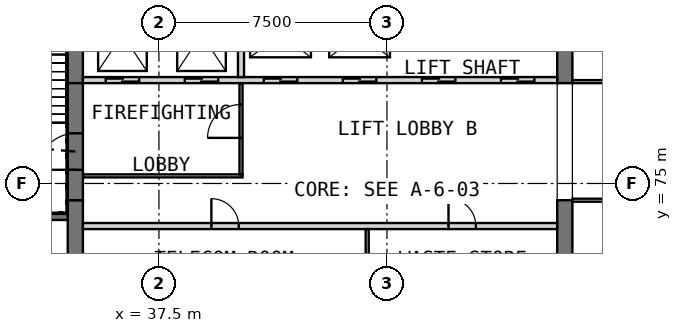
"""IFC4 building model, lengths in metres.
Left out: names, types, materials, properties, quantities, classifications, styles, units other than length and angle.
Written with IfcOpenShell. Run it as: python <this file> out.ifc"""

import sys

from ifc_helpers import new_model, si_unit, direction, frame, frame_2d, origin, place, context, subcontext, project, spatial, rectangle, extrude, element, fill, save


model = new_model("IFC4")
c1 = context("Model", 3, precision=1e-05, world=origin(), true_north=direction((0.0, 1.0)))
c2 = subcontext(c1, "Body", "Model", "MODEL_VIEW")
j1 = project(units=[si_unit("LENGTHUNIT", "METRE"), si_unit("PLANEANGLEUNIT", "RADIAN")], contexts=[c1])
p1 = place(None, origin())
s1 = spatial("IfcSite", under=j1, at=p1, CompositionType="ELEMENT")
p2 = place(p1, origin())
s2 = spatial("IfcBuilding", under=s1, at=p2, CompositionType="ELEMENT")
p3 = place(p2, origin())
s3 = spatial("IfcBuildingStorey", under=s2, at=p3, CompositionType="ELEMENT", Elevation=0.0)
p4 = place(p3, frame((34.75, 68.05, 0.0), z_axis=(0.0, 0.0, 1.0), x_axis=(0.0, 1.0, 0.0)))
e1 = element("IfcWall", 1, at=p4, inside=s3, PredefinedType="SHEAR", context=c2, shape_type="SweptSolid", body=[
    extrude(rectangle(XDim=6.4, YDim=0.5, at=frame_2d((3.2, 0.0))), origin(), (0.0, 0.0, 1.0), 8.0),
])
p5 = place(p3, frame((34.75, 78.3, 0.0), z_axis=(0.0, 0.0, 1.0), x_axis=(0.0, 1.0, 0.0)))
e2 = element("IfcWall", 2, at=p5, inside=s3, PredefinedType="SHEAR", context=c2, shape_type="SweptSolid", body=[
    extrude(rectangle(XDim=3.2, YDim=0.5, at=frame_2d((1.6, 0.0))), origin(), (0.0, 0.0, 1.0), 8.0),
])
p6 = place(p3, frame((50.85, 68.05, 0.0), z_axis=(0.0, 0.0, 1.0), x_axis=(0.0, 1.0, 0.0)))
e3 = element("IfcWall", 3, at=p6, inside=s3, PredefinedType="SHEAR", context=c2, shape_type="SweptSolid", body=[
    extrude(rectangle(XDim=6.4, YDim=0.5, at=frame_2d((3.2, 0.0))), origin(), (0.0, 0.0, 1.0), 8.0),
])
p7 = place(p3, frame((50.85, 78.3, 0.0), z_axis=(0.0, 0.0, 1.0), x_axis=(0.0, 1.0, 0.0)))
e4 = element("IfcWall", 4, at=p7, inside=s3, PredefinedType="SHEAR", context=c2, shape_type="SweptSolid", body=[
    extrude(rectangle(XDim=3.2, YDim=0.5, at=frame_2d((1.6, 0.0))), origin(), (0.0, 0.0, 1.0), 8.0),
])
p8 = place(p3, frame((35.0, 73.6, 0.0), z_axis=(0.0, 0.0, 1.0), x_axis=(1.0, 0.0, 0.0)))
e5 = element("IfcWall", 5, at=p8, inside=s3, PredefinedType="PARTITIONING", context=c2, shape_type="SweptSolid", body=[
    extrude(rectangle(XDim=15.6, YDim=0.2, at=frame_2d((7.8, 0.0))), origin(), (0.0, 0.0, 1.0), 7.7),
])
p9 = place(p8, frame((4.225, 0.0, 0.0)))
e6 = element("IfcOpeningElement", 6, at=p9, cuts=e5, PredefinedType="OPENING", context=c2, shape_type="SweptSolid", body=[
    extrude(rectangle(XDim=0.9, YDim=2.1, at=frame_2d((0.45, 1.05))), frame((0.0, 0.11, 0.0), z_axis=(0.0, -1.0, 0.0), x_axis=(1.0, 0.0, 0.0)), (0.0, 0.0, 1.0), 0.22),
])
p10 = place(p8, frame((12.025, 0.0, 0.0)))
e7 = element("IfcOpeningElement", 7, at=p10, cuts=e5, PredefinedType="OPENING", context=c2, shape_type="SweptSolid", body=[
    extrude(rectangle(XDim=0.9, YDim=2.1, at=frame_2d((0.45, 1.05))), frame((0.0, 0.11, 0.0), z_axis=(0.0, -1.0, 0.0), x_axis=(1.0, 0.0, 0.0)), (0.0, 0.0, 1.0), 0.22),
])
p11 = place(p3, frame((44.35, 71.5, 0.0), z_axis=(0.0, 0.0, 1.0), x_axis=(0.0, 1.0, 0.0)))
e8 = element("IfcWall", 8, at=p11, inside=s3, PredefinedType="PARTITIONING", context=c2, shape_type="SweptSolid", body=[
    extrude(rectangle(XDim=2.0, YDim=0.1, at=frame_2d((1.0, 0.0))), origin(), (0.0, 0.0, 1.0), 7.7),
])
p12 = place(p3, frame((35.0, 78.4, 0.0), z_axis=(0.0, 0.0, 1.0), x_axis=(1.0, 0.0, 0.0)))
e9 = element("IfcWall", 9, at=p12, inside=s3, PredefinedType="SOLIDWALL", context=c2, shape_type="SweptSolid", body=[
    extrude(rectangle(XDim=15.6, YDim=0.2, at=frame_2d((7.8, 0.0))), origin(), (0.0, 0.0, 1.0), 8.0),
])
p13 = place(p12, frame((0.75, 0.0, 0.0)))
e10 = element("IfcOpeningElement", 10, at=p13, cuts=e9, PredefinedType="OPENING", context=c2, shape_type="SweptSolid", body=[
    extrude(rectangle(XDim=1.1, YDim=2.1, at=frame_2d((0.55, 1.05))), frame((0.0, 0.11, 0.0), z_axis=(0.0, -1.0, 0.0), x_axis=(1.0, 0.0, 0.0)), (0.0, 0.0, 1.0), 0.22),
])
p14 = place(p12, frame((3.35, 0.0, 0.0)))
e11 = element("IfcOpeningElement", 11, at=p14, cuts=e9, PredefinedType="OPENING", context=c2, shape_type="SweptSolid", body=[
    extrude(rectangle(XDim=1.1, YDim=2.1, at=frame_2d((0.55, 1.05))), frame((0.0, 0.11, 0.0), z_axis=(0.0, -1.0, 0.0), x_axis=(1.0, 0.0, 0.0)), (0.0, 0.0, 1.0), 0.22),
])
p15 = place(p12, frame((5.95, 0.0, 0.0)))
e12 = element("IfcOpeningElement", 12, at=p15, cuts=e9, PredefinedType="OPENING", context=c2, shape_type="SweptSolid", body=[
    extrude(rectangle(XDim=1.1, YDim=2.1, at=frame_2d((0.55, 1.05))), frame((0.0, 0.11, 0.0), z_axis=(0.0, -1.0, 0.0), x_axis=(1.0, 0.0, 0.0)), (0.0, 0.0, 1.0), 0.22),
])
p16 = place(p12, frame((8.55, 0.0, 0.0)))
e13 = element("IfcOpeningElement", 13, at=p16, cuts=e9, PredefinedType="OPENING", context=c2, shape_type="SweptSolid", body=[
    extrude(rectangle(XDim=1.1, YDim=2.1, at=frame_2d((0.55, 1.05))), frame((0.0, 0.11, 0.0), z_axis=(0.0, -1.0, 0.0), x_axis=(1.0, 0.0, 0.0)), (0.0, 0.0, 1.0), 0.22),
])
p17 = place(p12, frame((11.15, 0.0, 0.0)))
e14 = element("IfcOpeningElement", 14, at=p17, cuts=e9, PredefinedType="OPENING", context=c2, shape_type="SweptSolid", body=[
    extrude(rectangle(XDim=1.1, YDim=2.1, at=frame_2d((0.55, 1.05))), frame((0.0, 0.11, 0.0), z_axis=(0.0, -1.0, 0.0), x_axis=(1.0, 0.0, 0.0)), (0.0, 0.0, 1.0), 0.22),
])
p18 = place(p12, frame((13.75, 0.0, 0.0)))
e15 = element("IfcOpeningElement", 15, at=p18, cuts=e9, PredefinedType="OPENING", context=c2, shape_type="SweptSolid", body=[
    extrude(rectangle(XDim=1.1, YDim=2.1, at=frame_2d((0.55, 1.05))), frame((0.0, 0.11, 0.0), z_axis=(0.0, -1.0, 0.0), x_axis=(1.0, 0.0, 0.0)), (0.0, 0.0, 1.0), 0.22),
])
p19 = place(p3, frame((40.2, 78.5, 0.0), z_axis=(0.0, 0.0, 1.0), x_axis=(0.0, 1.0, 0.0)))
e16 = element("IfcWall", 16, at=p19, inside=s3, PredefinedType="SOLIDWALL", context=c2, shape_type="SweptSolid", body=[
    extrude(rectangle(XDim=3.0, YDim=0.2, at=frame_2d((1.5, 0.0))), origin(), (0.0, 0.0, 1.0), 8.0),
])
p20 = place(p3, frame((35.0, 75.25, 0.0), z_axis=(0.0, 0.0, 1.0), x_axis=(1.0, 0.0, 0.0)))
e17 = element("IfcWall", 17, at=p20, inside=s3, PredefinedType="PARTITIONING", context=c2, shape_type="SweptSolid", body=[
    extrude(rectangle(XDim=5.25, YDim=0.1, at=frame_2d((2.625, 0.0))), origin(), (0.0, 0.0, 1.0), 7.7),
])
p21 = place(p3, frame((40.2, 75.3, 0.0), z_axis=(0.0, 0.0, 1.0), x_axis=(0.0, 1.0, 0.0)))
e18 = element("IfcWall", 18, at=p21, inside=s3, PredefinedType="PARTITIONING", context=c2, shape_type="SweptSolid", body=[
    extrude(rectangle(XDim=3.0, YDim=0.1, at=frame_2d((1.5, 0.0))), origin(), (0.0, 0.0, 1.0), 7.7),
])
p22 = place(p21, frame((1.2, 0.0, 0.0)))
e19 = element("IfcOpeningElement", 19, at=p22, cuts=e18, PredefinedType="OPENING", context=c2, shape_type="SweptSolid", body=[
    extrude(rectangle(XDim=1.1, YDim=2.1, at=frame_2d((0.55, 1.05))), frame((0.0, 0.06, 0.0), z_axis=(0.0, -1.0, 0.0), x_axis=(1.0, 0.0, 0.0)), (0.0, 0.0, 1.0), 0.12),
])
p23 = place(p3, frame((34.75, 74.45, 0.0), z_axis=(0.0, 0.0, 1.0), x_axis=(0.0, 1.0, 0.0)))
e20 = element("IfcWall", 20, at=p23, inside=s3, PredefinedType="SOLIDWALL", context=c2, shape_type="SweptSolid", body=[
    extrude(rectangle(XDim=3.85, YDim=0.5, at=frame_2d((1.925, 0.0))), origin(), (0.0, 0.0, 1.0), 6.8),
])
p24 = place(p23, frame((1.0, 0.0, 0.0)))
e21 = element("IfcOpeningElement", 21, at=p24, cuts=e20, PredefinedType="OPENING", context=c2, shape_type="SweptSolid", body=[
    extrude(rectangle(XDim=1.2, YDim=2.1, at=frame_2d((0.6, 1.05))), frame((0.0, 0.26, 0.0), z_axis=(0.0, -1.0, 0.0), x_axis=(1.0, 0.0, 0.0)), (0.0, 0.0, 1.0), 0.52),
])
p25 = place(p3, frame((31.0, 73.9, 0.0), z_axis=(0.0, 0.0, 1.0), x_axis=(1.0, 0.0, 0.0)))
e22 = element("IfcWall", 22, at=p25, inside=s3, PredefinedType="SOLIDWALL", context=c2, shape_type="SweptSolid", body=[
    extrude(rectangle(XDim=3.5, YDim=0.2, at=frame_2d((1.75, 0.0))), origin(), (0.0, 0.0, 1.0), 7.7),
])
p26 = place(p25, frame((1.3, 0.0, 0.0)))
e23 = element("IfcOpeningElement", 23, at=p26, cuts=e22, PredefinedType="OPENING", context=c2, shape_type="SweptSolid", body=[
    extrude(rectangle(XDim=0.9, YDim=2.1, at=frame_2d((0.45, 1.05))), frame((0.0, 0.11, 0.0), z_axis=(0.0, -1.0, 0.0), x_axis=(1.0, 0.0, 0.0)), (0.0, 0.0, 1.0), 0.22),
])
p27 = place(p3, frame((51.1, 74.45, 0.0), z_axis=(0.0, 0.0, 1.0), x_axis=(1.0, 0.0, 0.0)))
e24 = element("IfcWall", 24, at=p27, inside=s3, PredefinedType="PARTITIONING", context=c2, shape_type="SweptSolid", body=[
    extrude(rectangle(XDim=7.9, YDim=0.1, at=frame_2d((3.95, 0.0))), origin(), (0.0, 0.0, 1.0), 7.7),
])
p28 = place(p27, frame((3.5, 0.0, 0.0)))
e25 = element("IfcOpeningElement", 25, at=p28, cuts=e24, PredefinedType="OPENING", context=c2, shape_type="SweptSolid", body=[
    extrude(rectangle(XDim=0.9, YDim=2.1, at=frame_2d((0.45, 1.05))), frame((0.0, 0.06, 0.0), z_axis=(0.0, -1.0, 0.0), x_axis=(1.0, 0.0, 0.0)), (0.0, 0.0, 1.0), 0.12),
])
p29 = place(p3, frame((51.1, 78.35, 0.0), z_axis=(0.0, 0.0, 1.0), x_axis=(1.0, 0.0, 0.0)))
e26 = element("IfcWall", 26, at=p29, inside=s3, PredefinedType="PARTITIONING", context=c2, shape_type="SweptSolid", body=[
    extrude(rectangle(XDim=7.9, YDim=0.1, at=frame_2d((3.95, 0.0))), origin(), (0.0, 0.0, 1.0), 7.7),
])
p30 = place(p29, frame((1.925, 0.0, 0.0)))
e27 = element("IfcOpeningElement", 27, at=p30, cuts=e26, PredefinedType="OPENING", context=c2, shape_type="SweptSolid", body=[
    extrude(rectangle(XDim=0.9, YDim=2.1, at=frame_2d((0.45, 1.05))), frame((0.0, 0.06, 0.0), z_axis=(0.0, -1.0, 0.0), x_axis=(1.0, 0.0, 0.0)), (0.0, 0.0, 1.0), 0.12),
])
p31 = place(p29, frame((5.875, 0.0, 0.0)))
e28 = element("IfcOpeningElement", 28, at=p31, cuts=e26, PredefinedType="OPENING", context=c2, shape_type="SweptSolid", body=[
    extrude(rectangle(XDim=0.9, YDim=2.1, at=frame_2d((0.45, 1.05))), frame((0.0, 0.06, 0.0), z_axis=(0.0, -1.0, 0.0), x_axis=(1.0, 0.0, 0.0)), (0.0, 0.0, 1.0), 0.12),
])
p32 = place(p9, origin())
e29 = element("IfcDoor", 29, at=p32, inside=s3, OperationType="SINGLE_SWING_RIGHT", PredefinedType="DOOR", context=c2, shape_type="SweptSolid", body=[
    extrude(rectangle(XDim=0.9, YDim=2.1, at=frame_2d((0.45, 1.05))), frame((0.0, 0.025, 0.0), z_axis=(0.0, -1.0, 0.0), x_axis=(1.0, 0.0, 0.0)), (0.0, 0.0, 1.0), 0.05),
])
fill(e6, e29)
p33 = place(p10, origin())
e30 = element("IfcDoor", 30, at=p33, inside=s3, OperationType="SINGLE_SWING_LEFT", PredefinedType="DOOR", context=c2, shape_type="SweptSolid", body=[
    extrude(rectangle(XDim=0.9, YDim=2.1, at=frame_2d((0.45, 1.05))), frame((0.0, 0.025, 0.0), z_axis=(0.0, -1.0, 0.0), x_axis=(1.0, 0.0, 0.0)), (0.0, 0.0, 1.0), 0.05),
])
fill(e7, e30)
p34 = place(p13, origin())
e31 = element("IfcDoor", 31, at=p34, inside=s3, OperationType="DOUBLE_DOOR_SLIDING", PredefinedType="DOOR", context=c2, shape_type="SweptSolid", body=[
    extrude(rectangle(XDim=1.1, YDim=2.1, at=frame_2d((0.55, 1.05))), frame((0.0, 0.025, 0.0), z_axis=(0.0, -1.0, 0.0), x_axis=(1.0, 0.0, 0.0)), (0.0, 0.0, 1.0), 0.05),
])
fill(e10, e31)
p35 = place(p14, origin())
e32 = element("IfcDoor", 32, at=p35, inside=s3, OperationType="DOUBLE_DOOR_SLIDING", PredefinedType="DOOR", context=c2, shape_type="SweptSolid", body=[
    extrude(rectangle(XDim=1.1, YDim=2.1, at=frame_2d((0.55, 1.05))), frame((0.0, 0.025, 0.0), z_axis=(0.0, -1.0, 0.0), x_axis=(1.0, 0.0, 0.0)), (0.0, 0.0, 1.0), 0.05),
])
fill(e11, e32)
p36 = place(p15, origin())
e33 = element("IfcDoor", 33, at=p36, inside=s3, OperationType="DOUBLE_DOOR_SLIDING", PredefinedType="DOOR", context=c2, shape_type="SweptSolid", body=[
    extrude(rectangle(XDim=1.1, YDim=2.1, at=frame_2d((0.55, 1.05))), frame((0.0, 0.025, 0.0), z_axis=(0.0, -1.0, 0.0), x_axis=(1.0, 0.0, 0.0)), (0.0, 0.0, 1.0), 0.05),
])
fill(e12, e33)
p37 = place(p16, origin())
e34 = element("IfcDoor", 34, at=p37, inside=s3, OperationType="DOUBLE_DOOR_SLIDING", PredefinedType="DOOR", context=c2, shape_type="SweptSolid", body=[
    extrude(rectangle(XDim=1.1, YDim=2.1, at=frame_2d((0.55, 1.05))), frame((0.0, 0.025, 0.0), z_axis=(0.0, -1.0, 0.0), x_axis=(1.0, 0.0, 0.0)), (0.0, 0.0, 1.0), 0.05),
])
fill(e13, e34)
p38 = place(p17, origin())
e35 = element("IfcDoor", 35, at=p38, inside=s3, OperationType="DOUBLE_DOOR_SLIDING", PredefinedType="DOOR", context=c2, shape_type="SweptSolid", body=[
    extrude(rectangle(XDim=1.1, YDim=2.1, at=frame_2d((0.55, 1.05))), frame((0.0, 0.025, 0.0), z_axis=(0.0, -1.0, 0.0), x_axis=(1.0, 0.0, 0.0)), (0.0, 0.0, 1.0), 0.05),
])
fill(e14, e35)
p39 = place(p18, origin())
e36 = element("IfcDoor", 36, at=p39, inside=s3, OperationType="DOUBLE_DOOR_SLIDING", PredefinedType="DOOR", context=c2, shape_type="SweptSolid", body=[
    extrude(rectangle(XDim=1.1, YDim=2.1, at=frame_2d((0.55, 1.05))), frame((0.0, 0.025, 0.0), z_axis=(0.0, -1.0, 0.0), x_axis=(1.0, 0.0, 0.0)), (0.0, 0.0, 1.0), 0.05),
])
fill(e15, e36)
p40 = place(p22, origin())
e37 = element("IfcDoor", 37, at=p40, inside=s3, OperationType="SINGLE_SWING_LEFT", PredefinedType="DOOR", context=c2, shape_type="SweptSolid", body=[
    extrude(rectangle(XDim=1.1, YDim=2.1, at=frame_2d((0.55, 1.05))), frame((0.0, 0.025, 0.0), z_axis=(0.0, -1.0, 0.0), x_axis=(1.0, 0.0, 0.0)), (0.0, 0.0, 1.0), 0.05),
])
fill(e19, e37)
p41 = place(p24, origin())
e38 = element("IfcDoor", 38, at=p41, inside=s3, OperationType="SINGLE_SWING_RIGHT", PredefinedType="DOOR", context=c2, shape_type="SweptSolid", body=[
    extrude(rectangle(XDim=1.2, YDim=2.1, at=frame_2d((0.6, 1.05))), frame((0.0, 0.025, 0.0), z_axis=(0.0, -1.0, 0.0), x_axis=(1.0, 0.0, 0.0)), (0.0, 0.0, 1.0), 0.05),
])
fill(e21, e38)
save(model, sys.argv[1])
